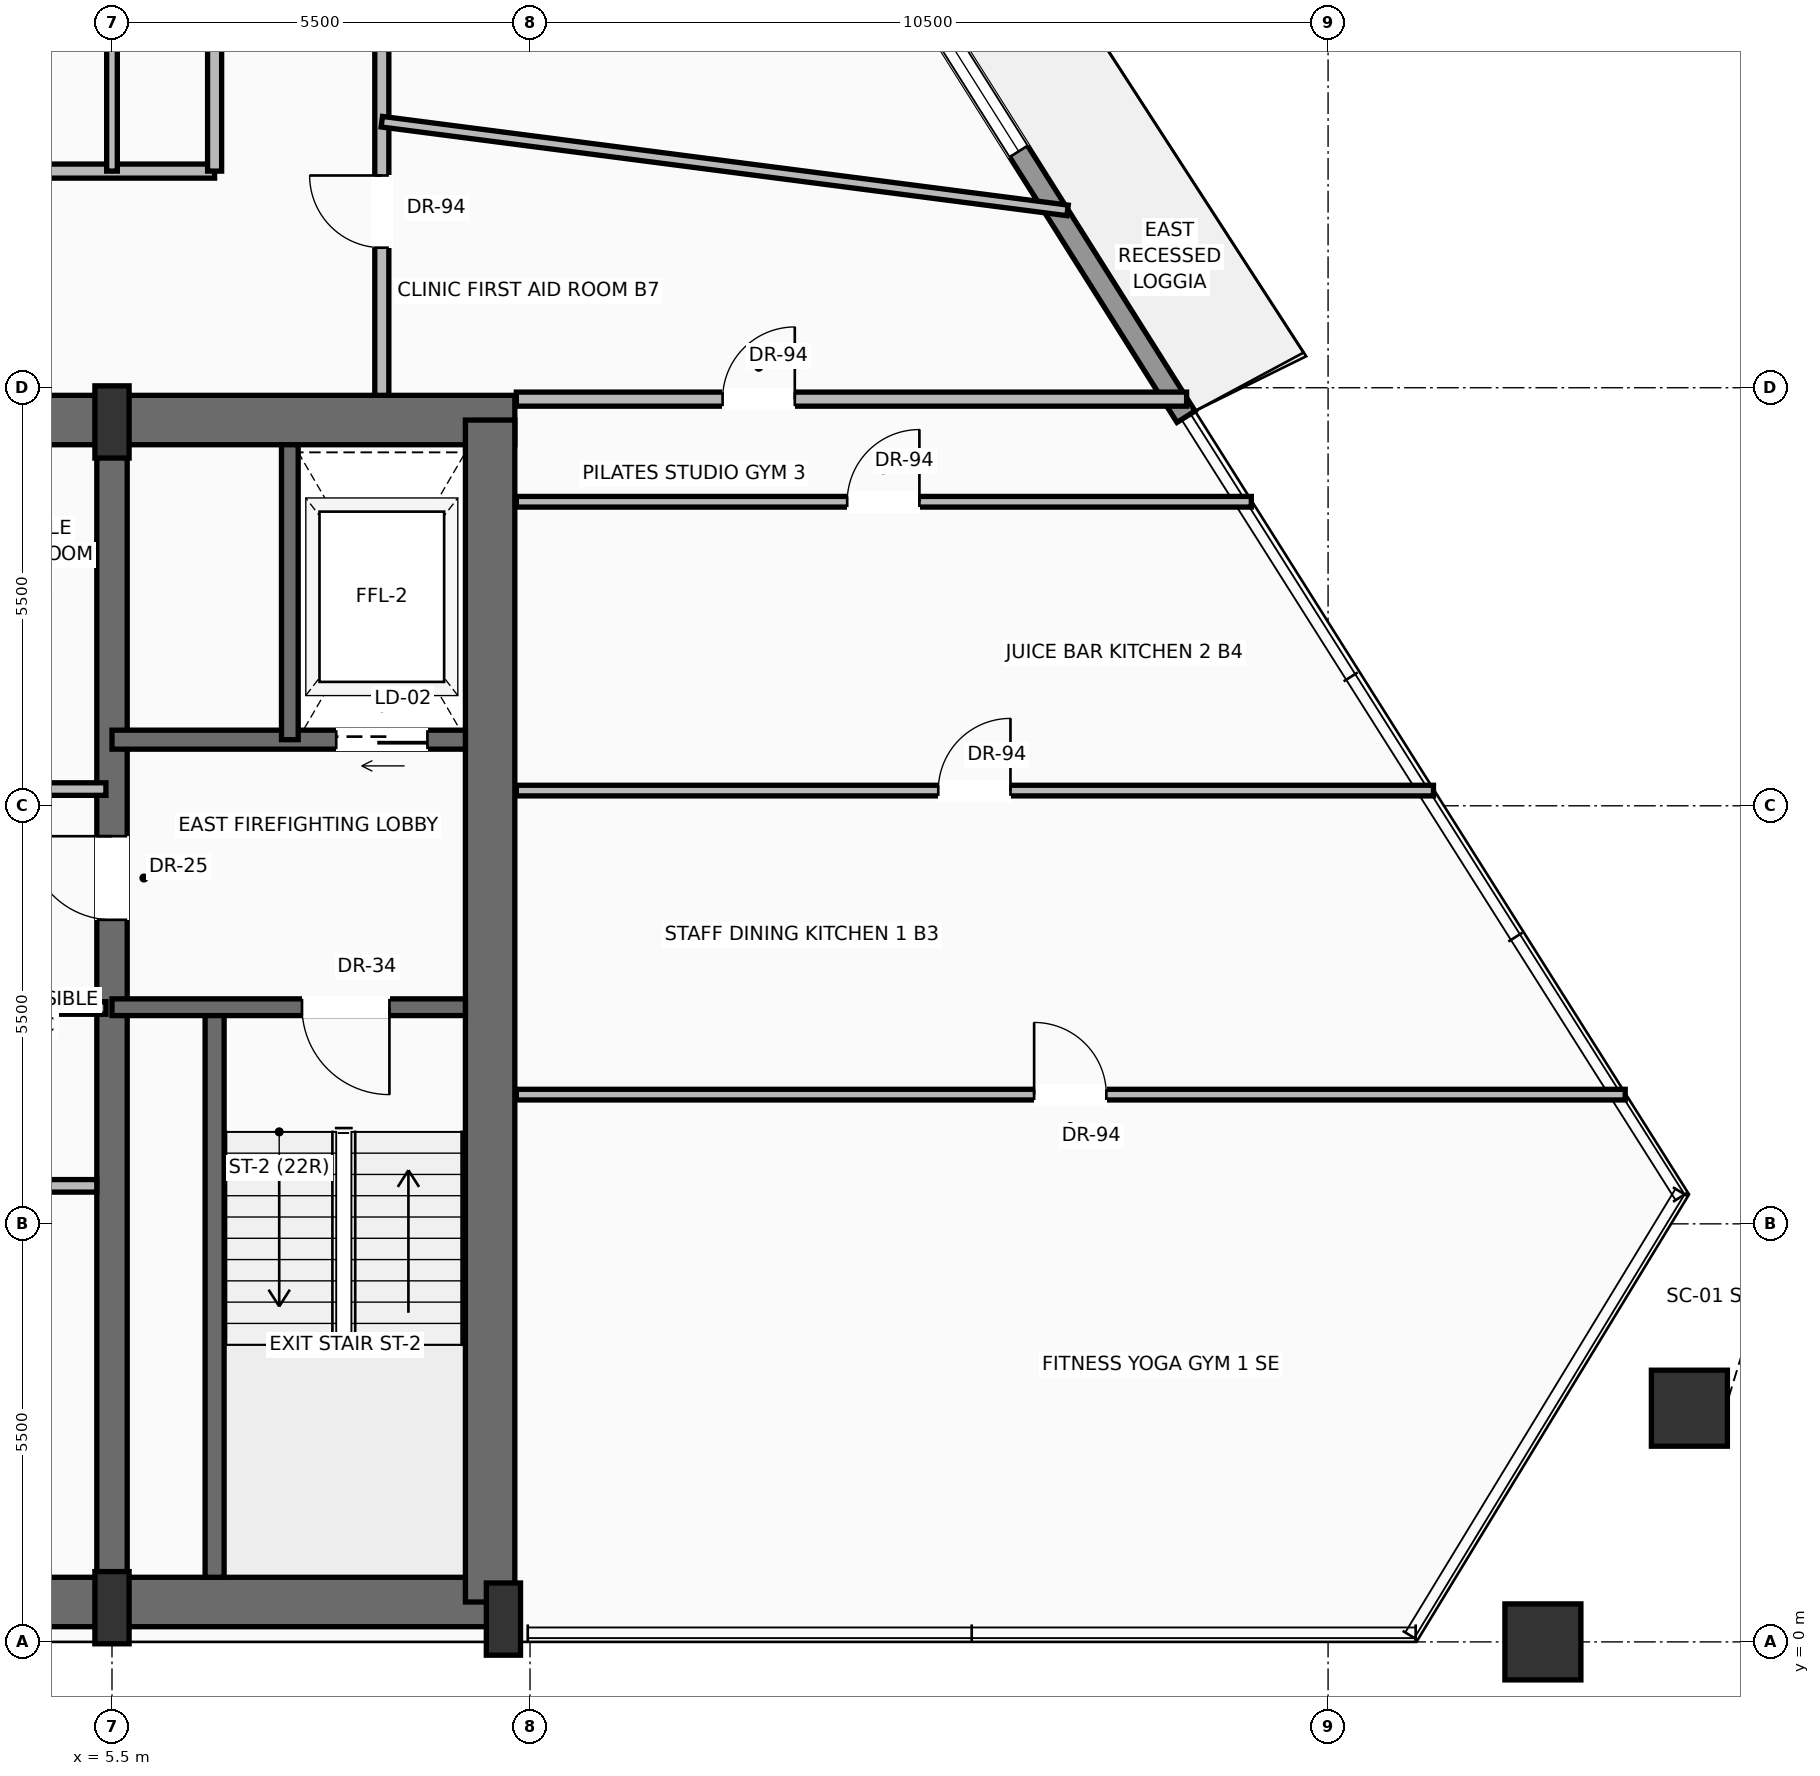
"""IFC4 building model, lengths in metres.
Left out: names, types, materials, properties, quantities, classifications, styles, units other than length and angle.
Written with IfcOpenShell. Run it as: python <this file> out.ifc"""

import sys

from ifc_helpers import new_model, si_unit, direction, frame, frame_2d, origin, origin_2d, place, context, subcontext, project, spatial, rectangle, hollow_rectangle, extrude, source, transform, mapped, element, fill, save


model = new_model("IFC4")
c1 = context("Model", 3, precision=1e-05, world=origin(), true_north=direction((0.0, 1.0)))
c2 = subcontext(c1, "Body", "Model", "MODEL_VIEW")
j1 = project(units=[si_unit("LENGTHUNIT", "METRE"), si_unit("PLANEANGLEUNIT", "RADIAN")], contexts=[c1])
p1 = place(None, origin())
s1 = spatial("IfcSite", under=j1, at=p1, CompositionType="ELEMENT")
p2 = place(p1, origin())
s2 = spatial("IfcBuilding", under=s1, at=p2, CompositionType="ELEMENT")
p3 = place(p2, frame((0.0, 0.0, 204.3)))
s3 = spatial("IfcBuildingStorey", under=s2, at=p3, CompositionType="ELEMENT", Elevation=204.3)
p4 = place(p3, frame((-10.65, 0.525, 0.0), z_axis=(0.0, 0.0, 1.0), x_axis=(1.0, 0.0, 0.0)))
e1 = element("IfcWall", 1, at=p4, inside=s3, PredefinedType="SHEAR", context=c2, shape_type="SweptSolid", body=[
    extrude(rectangle(XDim=21.3, YDim=0.65, at=frame_2d((10.65, 0.0))), origin(), (0.0, 0.0, 1.0), 3.47),
])
p5 = place(p3, frame((-10.8, 16.075, 0.0), z_axis=(0.0, 0.0, 1.0), x_axis=(1.0, 0.0, 0.0)))
e2 = element("IfcWall", 2, at=p5, inside=s3, PredefinedType="SHEAR", context=c2, shape_type="SweptSolid", body=[
    extrude(rectangle(XDim=21.6, YDim=0.65, at=frame_2d((10.8, 0.0))), origin(), (0.0, 0.0, 1.0), 3.47),
])
p6 = place(p5, frame((3.37, 0.0, 0.0)))
e3 = element("IfcOpeningElement", 3, at=p6, cuts=e2, PredefinedType="OPENING", context=c2, shape_type="SweptSolid", body=[
    extrude(rectangle(XDim=1.3, YDim=2.3, at=frame_2d((0.65, 1.15))), frame((0.0, 0.335, 0.0), z_axis=(0.0, -1.0, 0.0), x_axis=(1.0, 0.0, 0.0)), (0.0, 0.0, 1.0), 0.67),
])
p7 = place(p5, frame((9.8, 0.0, 0.0)))
e4 = element("IfcOpeningElement", 4, at=p7, cuts=e2, PredefinedType="OPENING", context=c2, shape_type="SweptSolid", body=[
    extrude(rectangle(XDim=2.0, YDim=2.4, at=frame_2d((1.0, 1.2))), frame((0.0, 0.335, 0.0), z_axis=(0.0, -1.0, 0.0), x_axis=(1.0, 0.0, 0.0)), (0.0, 0.0, 1.0), 0.67),
])
p8 = place(p3, frame((10.475, 0.525, 0.0), z_axis=(0.0, 0.0, 1.0), x_axis=(0.0, 1.0, 0.0)))
e5 = element("IfcWall", 5, at=p8, inside=s3, PredefinedType="SHEAR", context=c2, shape_type="SweptSolid", body=[
    extrude(rectangle(XDim=15.55, YDim=0.65, at=frame_2d((7.775, 0.0))), origin(), (0.0, 0.0, 1.0), 3.47),
])
p9 = place(p3, frame((5.5, 0.525, 0.0), z_axis=(0.0, 0.0, 1.0), x_axis=(0.0, 1.0, 0.0)))
e6 = element("IfcWall", 6, at=p9, inside=s3, PredefinedType="SHEAR", context=c2, shape_type="SweptSolid", body=[
    extrude(rectangle(XDim=15.55, YDim=0.4, at=frame_2d((7.775, 0.0))), origin(), (0.0, 0.0, 1.0), 3.47),
])
p10 = place(p9, frame((8.975, 0.0, 0.0)))
e7 = element("IfcOpeningElement", 7, at=p10, cuts=e6, PredefinedType="OPENING", context=c2, shape_type="SweptSolid", body=[
    extrude(rectangle(XDim=1.1, YDim=2.2, at=frame_2d((0.55, 1.1))), frame((0.0, 0.21, 0.0), z_axis=(0.0, -1.0, 0.0), x_axis=(1.0, 0.0, 0.0)), (0.0, 0.0, 1.0), 0.42),
])
m1 = source(origin(), c2, "Body", "SweptSolid", [
    extrude(rectangle(XDim=0.45, YDim=0.95, at=origin_2d()), origin(), (0.0, 0.0, 1.0), 3.7),
])
for number, where, z_axis, x_axis in (
    (8, (5.5, 0.45, 0.0), (0.0, 0.0, 1.0), (1.0, 0.0, 0.0)),
    (9, (10.65, 0.3, 0.0), (0.0, 0.0, 1.0), (1.0, 0.0, 0.0)),
    (10, (5.5, 16.05, 0.0), (0.0, 0.0, 1.0), (1.0, 0.0, 0.0)),
):
    element("IfcColumn", number, at=place(p3, frame(where, z_axis=z_axis, x_axis=x_axis)), inside=s3, PredefinedType="PILASTER", context=c2, shape_type="MappedRepresentation", body=[
        mapped(m1, transform((0.0, 0.0, 0.0), scale=1.0)),
    ])
m2 = source(origin(), c2, "Body", "SweptSolid", [
    extrude(hollow_rectangle(XDim=1.0, YDim=1.0, WallThickness=0.05, at=origin_2d()), origin(), (0.0, 0.0, 1.0), 3.691),
])
p11 = place(p3, frame((24.326, 0.0, 0.004), z_axis=(0.004034625538, 0.0, 0.999991860865), x_axis=(0.0, 1.0, 0.0)))
e11 = element("IfcColumn", 11, at=p11, inside=s3, PredefinedType="COLUMN", context=c2, shape_type="MappedRepresentation", body=[
    mapped(m2, transform((0.0, 0.0, 0.0), scale=1.0)),
])
m3 = source(origin(), c2, "Body", "SweptSolid", [
    extrude(hollow_rectangle(XDim=1.0, YDim=1.0, WallThickness=0.05, at=origin_2d()), origin(), (0.0, 0.0, 1.0), 3.692),
])
p12 = place(p3, frame((26.254, 3.075, 0.004), z_axis=(-0.006745610333, -0.014549355619, 0.999871398227), x_axis=(0.907233850957, -0.420626603626, 0.0)))
e12 = element("IfcColumn", 12, at=p12, inside=s3, PredefinedType="COLUMN", context=c2, shape_type="MappedRepresentation", body=[
    mapped(m3, transform((0.0, 0.0, 0.0), scale=1.0)),
])
p13 = place(p3, frame((9.417, 32.314, 0.0), z_axis=(0.0, 0.0, 1.0), x_axis=(0.533466142651, -0.845821420067, 0.0)))
e13 = element("IfcWall", 13, at=p13, inside=s3, PredefinedType="SOLIDWALL", context=c2, shape_type="SweptSolid", body=[
    extrude(rectangle(XDim=19.147, YDim=0.28, at=frame_2d((9.574, 0.0))), origin(), (0.0, 0.0, 1.0), 3.05),
])
p14 = place(p13, frame((4.595, 0.0, 0.0)))
e14 = element("IfcOpeningElement", 14, at=p14, cuts=e13, PredefinedType="OPENING", context=c2, shape_type="SweptSolid", body=[
    extrude(rectangle(XDim=1.6, YDim=2.35, at=frame_2d((0.8, 1.175))), frame((0.0, 0.15, 0.0), z_axis=(0.0, -1.0, 0.0), x_axis=(1.0, 0.0, 0.0)), (0.0, 0.0, 1.0), 0.3),
])
p15 = place(p13, frame((13.02, 0.0, 0.9)))
e15 = element("IfcOpeningElement", 15, at=p15, cuts=e13, PredefinedType="OPENING", context=c2, shape_type="SweptSolid", body=[
    extrude(rectangle(XDim=2.0, YDim=1.85, at=frame_2d((1.0, 0.925))), frame((0.0, 0.15, 0.0), z_axis=(0.0, -1.0, 0.0), x_axis=(1.0, 0.0, 0.0)), (0.0, 0.0, 1.0), 0.3),
])
p16 = place(p3, frame((6.85, 0.85, 0.0), z_axis=(0.0, 0.0, 1.0), x_axis=(0.0, 1.0, 0.0)))
e16 = element("IfcWall", 16, at=p16, inside=s3, PredefinedType="SOLIDWALL", context=c2, shape_type="SweptSolid", body=[
    extrude(rectangle(XDim=7.5, YDim=0.25, at=frame_2d((3.75, 0.0))), origin(), (0.0, 0.0, 1.0), 3.47),
])
p17 = place(p3, frame((10.15, 8.35, 0.0), z_axis=(0.0, 0.0, 1.0), x_axis=(-1.0, 0.0, 0.0)))
e17 = element("IfcWall", 17, at=p17, inside=s3, PredefinedType="SOLIDWALL", context=c2, shape_type="SweptSolid", body=[
    extrude(rectangle(XDim=4.65, YDim=0.22, at=frame_2d((2.325, 0.0))), origin(), (0.0, 0.0, 1.0), 3.47),
])
p18 = place(p17, frame((1.0, 0.0, 0.0)))
e18 = element("IfcOpeningElement", 18, at=p18, cuts=e17, PredefinedType="OPENING", context=c2, shape_type="SweptSolid", body=[
    extrude(rectangle(XDim=1.15, YDim=2.2, at=frame_2d((0.575, 1.1))), frame((0.0, 0.12, 0.0), z_axis=(0.0, -1.0, 0.0), x_axis=(1.0, 0.0, 0.0)), (0.0, 0.0, 1.0), 0.24),
])
p19 = place(p3, frame((10.15, 11.87, 0.0), z_axis=(0.0, 0.0, 1.0), x_axis=(-1.0, 0.0, 0.0)))
e19 = element("IfcWall", 19, at=p19, inside=s3, PredefinedType="SOLIDWALL", context=c2, shape_type="SweptSolid", body=[
    extrude(rectangle(XDim=4.65, YDim=0.25, at=frame_2d((2.325, 0.0))), origin(), (0.0, 0.0, 1.0), 3.47),
])
p20 = place(p19, frame((0.5, 0.0, 0.0)))
e20 = element("IfcOpeningElement", 20, at=p20, cuts=e19, PredefinedType="OPENING", context=c2, shape_type="SweptSolid", body=[
    extrude(rectangle(XDim=1.2, YDim=2.25, at=frame_2d((0.6, 1.125))), frame((0.0, 0.135, 0.0), z_axis=(0.0, -1.0, 0.0), x_axis=(1.0, 0.0, 0.0)), (0.0, 0.0, 1.0), 0.27),
])
p21 = place(p3, frame((7.84, 11.87, 0.0), z_axis=(0.0, 0.0, 1.0), x_axis=(0.0, 1.0, 0.0)))
e21 = element("IfcWall", 21, at=p21, inside=s3, PredefinedType="SOLIDWALL", context=c2, shape_type="SweptSolid", body=[
    extrude(rectangle(XDim=3.88, YDim=0.22, at=frame_2d((1.94, 0.0))), origin(), (0.0, 0.0, 1.0), 3.47),
])
p22 = place(p3, frame((1.82, 6.0, 0.0), z_axis=(0.0, 0.0, 1.0), x_axis=(1.0, 0.0, 0.0)))
e22 = element("IfcWall", 22, at=p22, inside=s3, PredefinedType="PARTITIONING", context=c2, shape_type="SweptSolid", body=[
    extrude(rectangle(XDim=3.48, YDim=0.165, at=frame_2d((1.74, 0.0))), origin(), (0.0, 0.0, 1.0), 3.462),
])
p23 = place(p22, frame((0.38, 0.0, 0.0)))
e23 = element("IfcOpeningElement", 23, at=p23, cuts=e22, PredefinedType="OPENING", context=c2, shape_type="SweptSolid", body=[
    extrude(rectangle(XDim=0.9, YDim=2.1, at=frame_2d((0.45, 1.05))), frame((0.0, 0.093, 0.0), z_axis=(0.0, -1.0, 0.0), x_axis=(1.0, 0.0, 0.0)), (0.0, 0.0, 1.0), 0.185),
])
for number, where, z_axis, x_axis in (
    (24, (3.54, 8.34, 0.0), (0.0, 0.0, 1.0), (1.0, 0.0, 0.0)),
    (25, (3.54, 11.22, 0.0), (0.0, 0.0, 1.0), (1.0, 0.0, 0.0)),
):
    element("IfcWall", number, at=place(p3, frame(where, z_axis=z_axis, x_axis=x_axis)), inside=s3, PredefinedType="PARTITIONING", context=c2, shape_type="SweptSolid", body=[
        extrude(rectangle(XDim=1.88, YDim=0.165, at=frame_2d((0.94, 0.0))), origin(), (0.0, 0.0, 1.0), 3.462),
    ])
p24 = place(p3, frame((-7.35, 19.35, 0.0), z_axis=(0.0, 0.0, 1.0), x_axis=(1.0, 0.0, 0.0)))
e26 = element("IfcWall", 26, at=p24, inside=s3, PredefinedType="PARTITIONING", context=c2, shape_type="SweptSolid", body=[
    extrude(rectangle(XDim=14.2, YDim=0.185, at=frame_2d((7.1, 0.0))), origin(), (0.0, 0.0, 1.0), 2.846),
])
p25 = place(p24, frame((6.625, 0.0, 0.0)))
e27 = element("IfcOpeningElement", 27, at=p25, cuts=e26, PredefinedType="OPENING", context=c2, shape_type="SweptSolid", body=[
    extrude(rectangle(XDim=0.95, YDim=2.2, at=frame_2d((0.475, 1.1))), frame((0.0, 0.103, 0.0), z_axis=(0.0, -1.0, 0.0), x_axis=(1.0, 0.0, 0.0)), (0.0, 0.0, 1.0), 0.205),
])
p26 = place(p3, frame((6.85, 19.35, 0.0), z_axis=(0.0, 0.0, 1.0), x_axis=(0.0, 1.0, 0.0)))
e28 = element("IfcWall", 28, at=p26, inside=s3, PredefinedType="PARTITIONING", context=c2, shape_type="SweptSolid", body=[
    extrude(rectangle(XDim=2.85, YDim=0.185, at=frame_2d((1.425, 0.0))), origin(), (0.0, 0.0, 1.0), 3.462),
])
p27 = place(p3, frame((9.05, 16.4, 0.0), z_axis=(0.0, 0.0, 1.0), x_axis=(0.0, 1.0, 0.0)))
e29 = element("IfcWall", 29, at=p27, inside=s3, PredefinedType="PARTITIONING", context=c2, shape_type="SweptSolid", body=[
    extrude(rectangle(XDim=5.8, YDim=0.185, at=frame_2d((2.9, 0.0))), origin(), (0.0, 0.0, 1.0), 3.462),
])
p28 = place(p27, frame((1.942, 0.0, 0.0)))
e30 = element("IfcOpeningElement", 30, at=p28, cuts=e29, PredefinedType="OPENING", context=c2, shape_type="SweptSolid", body=[
    extrude(rectangle(XDim=0.95, YDim=2.2, at=frame_2d((0.475, 1.1))), frame((0.0, 0.103, 0.0), z_axis=(0.0, -1.0, 0.0), x_axis=(1.0, 0.0, 0.0)), (0.0, 0.0, 1.0), 0.205),
])
p29 = place(p3, frame((10.82, 16.35, 0.0), z_axis=(0.0, 0.0, 1.0), x_axis=(1.0, 0.0, 0.0)))
e31 = element("IfcWall", 31, at=p29, inside=s3, PredefinedType="PARTITIONING", context=c2, shape_type="SweptSolid", body=[
    extrude(rectangle(XDim=8.819, YDim=0.185, at=frame_2d((4.409, 0.0))), origin(), (0.0, 0.0, 1.0), 3.462),
])
p30 = place(p29, frame((2.714, 0.0, 0.0)))
e32 = element("IfcOpeningElement", 32, at=p30, cuts=e31, PredefinedType="OPENING", context=c2, shape_type="SweptSolid", body=[
    extrude(rectangle(XDim=0.95, YDim=2.2, at=frame_2d((0.475, 1.1))), frame((0.0, 0.103, 0.0), z_axis=(0.0, -1.0, 0.0), x_axis=(1.0, 0.0, 0.0)), (0.0, 0.0, 1.0), 0.205),
])
p31 = place(p3, frame((5.5, 19.35, 0.0), z_axis=(0.0, 0.0, 1.0), x_axis=(0.0, 1.0, 0.0)))
e33 = element("IfcWall", 33, at=p31, inside=s3, PredefinedType="PARTITIONING", context=c2, shape_type="SweptSolid", body=[
    extrude(rectangle(XDim=13.15, YDim=0.14, at=frame_2d((6.575, 0.0))), origin(), (0.0, 0.0, 1.0), 2.846),
])
p32 = place(p3, frame((10.82, 7.2, 0.0), z_axis=(0.0, 0.0, 1.0), x_axis=(1.0, 0.0, 0.0)))
e34 = element("IfcWall", 34, at=p32, inside=s3, PredefinedType="PARTITIONING", context=c2, shape_type="SweptSolid", body=[
    extrude(rectangle(XDim=14.59, YDim=0.14, at=frame_2d((7.295, 0.0))), origin(), (0.0, 0.0, 1.0), 3.049),
])
p33 = place(p32, frame((6.812, 0.0, 0.0)))
e35 = element("IfcOpeningElement", 35, at=p33, cuts=e34, PredefinedType="OPENING", context=c2, shape_type="SweptSolid", body=[
    extrude(rectangle(XDim=0.95, YDim=2.2, at=frame_2d((0.475, 1.1))), frame((0.0, 0.08, 0.0), z_axis=(0.0, -1.0, 0.0), x_axis=(1.0, 0.0, 0.0)), (0.0, 0.0, 1.0), 0.16),
])
p34 = place(p3, frame((10.82, 11.2, 0.0), z_axis=(0.0, 0.0, 1.0), x_axis=(1.0, 0.0, 0.0)))
e36 = element("IfcWall", 36, at=p34, inside=s3, PredefinedType="PARTITIONING", context=c2, shape_type="SweptSolid", body=[
    extrude(rectangle(XDim=12.067, YDim=0.14, at=frame_2d((6.033, 0.0))), origin(), (0.0, 0.0, 1.0), 3.462),
])
p35 = place(p34, frame((5.551, 0.0, 0.0)))
e37 = element("IfcOpeningElement", 37, at=p35, cuts=e36, PredefinedType="OPENING", context=c2, shape_type="SweptSolid", body=[
    extrude(rectangle(XDim=0.95, YDim=2.2, at=frame_2d((0.475, 1.1))), frame((0.0, 0.08, 0.0), z_axis=(0.0, -1.0, 0.0), x_axis=(1.0, 0.0, 0.0)), (0.0, 0.0, 1.0), 0.16),
])
p36 = place(p3, frame((10.82, 15.0, 0.0), z_axis=(0.0, 0.0, 1.0), x_axis=(1.0, 0.0, 0.0)))
e38 = element("IfcWall", 38, at=p36, inside=s3, PredefinedType="PARTITIONING", context=c2, shape_type="SweptSolid", body=[
    extrude(rectangle(XDim=9.67, YDim=0.14, at=frame_2d((4.835, 0.0))), origin(), (0.0, 0.0, 1.0), 3.462),
])
p37 = place(p36, frame((4.353, 0.0, 0.0)))
e39 = element("IfcOpeningElement", 39, at=p37, cuts=e38, PredefinedType="OPENING", context=c2, shape_type="SweptSolid", body=[
    extrude(rectangle(XDim=0.95, YDim=2.2, at=frame_2d((0.475, 1.1))), frame((0.0, 0.08, 0.0), z_axis=(0.0, -1.0, 0.0), x_axis=(1.0, 0.0, 0.0)), (0.0, 0.0, 1.0), 0.16),
])
p38 = place(p3, frame((9.05, 20.0, 0.0), z_axis=(0.0, 0.0, 1.0), x_axis=(0.991742120267, -0.128248067777, 0.0)))
e40 = element("IfcWall", 40, at=p38, inside=s3, PredefinedType="PARTITIONING", context=c2, shape_type="SweptSolid", body=[
    extrude(rectangle(XDim=9.098, YDim=0.14, at=frame_2d((4.549, 0.0))), origin(), (0.0, 0.0, 1.0), 3.049),
])
m4 = source(origin(), c2, "Body", "SweptSolid", [
    extrude(rectangle(XDim=2.0, YDim=1.85, at=frame_2d((1.0, 0.925))), frame((0.0, 0.03, 0.0), z_axis=(0.0, -1.0, 0.0), x_axis=(1.0, 0.0, 0.0)), (0.0, 0.0, 1.0), 0.06),
])
p39 = place(p15, origin())
e41 = element("IfcWindow", 41, at=p39, inside=s3, PartitioningType="SINGLE_PANEL", PredefinedType="WINDOW", context=c2, shape_type="MappedRepresentation", body=[
    mapped(m4, transform((0.0, 0.0, 0.0), scale=1.0)),
])
fill(e15, e41)
m5 = source(origin(), c2, "Body", "SweptSolid", [
    extrude(rectangle(XDim=1.15, YDim=2.2, at=frame_2d((0.575, 1.1))), frame((0.0, 0.025, 0.0), z_axis=(0.0, -1.0, 0.0), x_axis=(1.0, 0.0, 0.0)), (0.0, 0.0, 1.0), 0.05),
])
p40 = place(p18, origin())
e42 = element("IfcDoor", 42, at=p40, inside=s3, OperationType="SINGLE_SWING_LEFT", PredefinedType="DOOR", context=c2, shape_type="MappedRepresentation", body=[
    mapped(m5, transform((0.0, 0.0, 0.0), scale=1.0)),
])
fill(e18, e42)
m6 = source(origin(), c2, "Body", "SweptSolid", [
    extrude(rectangle(XDim=1.1, YDim=2.2, at=frame_2d((0.55, 1.1))), frame((0.0, 0.025, 0.0), z_axis=(0.0, -1.0, 0.0), x_axis=(1.0, 0.0, 0.0)), (0.0, 0.0, 1.0), 0.05),
])
p41 = place(p10, origin())
e43 = element("IfcDoor", 43, at=p41, inside=s3, OperationType="SINGLE_SWING_RIGHT", PredefinedType="DOOR", context=c2, shape_type="MappedRepresentation", body=[
    mapped(m6, transform((0.0, 0.0, 0.0), scale=1.0)),
])
fill(e7, e43)
m7 = source(origin(), c2, "Body", "SweptSolid", [
    extrude(rectangle(XDim=1.2, YDim=2.25, at=frame_2d((0.6, 1.125))), frame((0.0, 0.025, 0.0), z_axis=(0.0, -1.0, 0.0), x_axis=(1.0, 0.0, 0.0)), (0.0, 0.0, 1.0), 0.05),
])
p42 = place(p20, origin())
e44 = element("IfcDoor", 44, at=p42, inside=s3, OperationType="SLIDING_TO_RIGHT", PredefinedType="DOOR", context=c2, shape_type="MappedRepresentation", body=[
    mapped(m7, transform((0.0, 0.0, 0.0), scale=1.0)),
])
fill(e20, e44)
m8 = source(origin(), c2, "Body", "SweptSolid", [
    extrude(rectangle(XDim=0.95, YDim=2.2, at=frame_2d((0.475, 1.1))), frame((0.0, 0.025, 0.0), z_axis=(0.0, -1.0, 0.0), x_axis=(1.0, 0.0, 0.0)), (0.0, 0.0, 1.0), 0.05),
])
p43 = place(p28, origin())
e45 = element("IfcDoor", 45, at=p43, inside=s3, OperationType="SINGLE_SWING_RIGHT", PredefinedType="DOOR", context=c2, shape_type="MappedRepresentation", body=[
    mapped(m8, transform((0.0, 0.0, 0.0), scale=1.0)),
])
fill(e30, e45)
p44 = place(p30, origin())
e46 = element("IfcDoor", 46, at=p44, inside=s3, OperationType="SINGLE_SWING_RIGHT", PredefinedType="DOOR", context=c2, shape_type="MappedRepresentation", body=[
    mapped(m8, transform((0.0, 0.0, 0.0), scale=1.0)),
])
fill(e32, e46)
p45 = place(p37, origin())
e47 = element("IfcDoor", 47, at=p45, inside=s3, OperationType="SINGLE_SWING_RIGHT", PredefinedType="DOOR", context=c2, shape_type="MappedRepresentation", body=[
    mapped(m8, transform((0.0, 0.0, 0.0), scale=1.0)),
])
fill(e39, e47)
p46 = place(p35, origin())
e48 = element("IfcDoor", 48, at=p46, inside=s3, OperationType="SINGLE_SWING_RIGHT", PredefinedType="DOOR", context=c2, shape_type="MappedRepresentation", body=[
    mapped(m8, transform((0.0, 0.0, 0.0), scale=1.0)),
])
fill(e37, e48)
p47 = place(p33, origin())
e49 = element("IfcDoor", 49, at=p47, inside=s3, OperationType="SINGLE_SWING_LEFT", PredefinedType="DOOR", context=c2, shape_type="MappedRepresentation", body=[
    mapped(m8, transform((0.0, 0.0, 0.0), scale=1.0)),
])
fill(e35, e49)
save(model, sys.argv[1])
